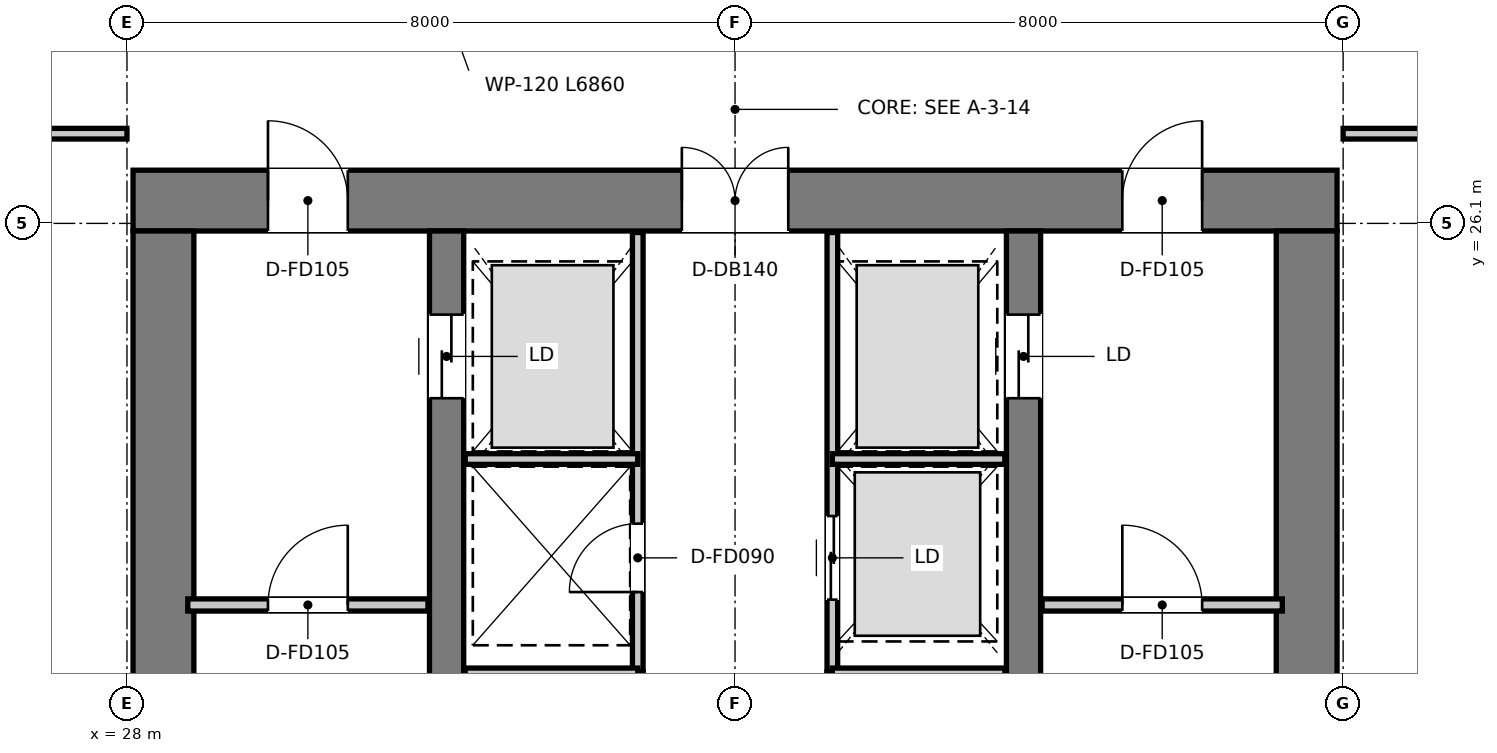
"""IFC4 building model, lengths in metres.
Left out: names, types, materials, properties, quantities, classifications, styles, units other than length and angle.
Written with IfcOpenShell. Run it as: python <this file> out.ifc"""

import sys

from ifc_helpers import new_model, si_unit, direction, frame, frame_2d, origin, place, context, subcontext, project, spatial, rectangle, extrude, element, fill, save


model = new_model("IFC4")
c1 = context("Model", 3, precision=1e-05, world=origin(), true_north=direction((0.0, 1.0)))
c2 = subcontext(c1, "Body", "Model", "MODEL_VIEW")
j1 = project(units=[si_unit("LENGTHUNIT", "METRE"), si_unit("PLANEANGLEUNIT", "RADIAN")], contexts=[c1])
p1 = place(None, origin())
s1 = spatial("IfcSite", under=j1, at=p1, CompositionType="ELEMENT")
p2 = place(p1, origin())
s2 = spatial("IfcBuilding", under=s1, at=p2, CompositionType="ELEMENT")
p3 = place(p2, frame((0.0, 0.0, 250.75)))
s3 = spatial("IfcBuildingStorey", under=s2, at=p3, CompositionType="ELEMENT", Elevation=250.75)
p4 = place(p3, frame((28.08, 26.4, 0.0), z_axis=(0.0, 0.0, 1.0), x_axis=(1.0, 0.0, 0.0)))
e1 = element("IfcWall", 1, at=p4, inside=s3, PredefinedType="SHEAR", context=c2, shape_type="SweptSolid", body=[
    extrude(rectangle(XDim=15.84, YDim=0.8, at=frame_2d((7.92, 0.0))), origin(), (0.0, 0.0, 1.0), 3.95),
])
p5 = place(p4, frame((7.22, 0.0, 0.0)))
e2 = element("IfcOpeningElement", 2, at=p5, cuts=e1, PredefinedType="OPENING", context=c2, shape_type="SweptSolid", body=[
    extrude(rectangle(XDim=1.4, YDim=2.2, at=frame_2d((0.7, 1.1))), frame((0.0, 0.41, 0.0), z_axis=(0.0, -1.0, 0.0), x_axis=(1.0, 0.0, 0.0)), (0.0, 0.0, 1.0), 0.82),
])
p6 = place(p4, frame((1.775, 0.0, 0.0)))
e3 = element("IfcOpeningElement", 3, at=p6, cuts=e1, PredefinedType="OPENING", context=c2, shape_type="SweptSolid", body=[
    extrude(rectangle(XDim=1.05, YDim=2.1, at=frame_2d((0.525, 1.05))), frame((0.0, 0.41, 0.0), z_axis=(0.0, -1.0, 0.0), x_axis=(1.0, 0.0, 0.0)), (0.0, 0.0, 1.0), 0.82),
])
p7 = place(p4, frame((13.015, 0.0, 0.0)))
e4 = element("IfcOpeningElement", 4, at=p7, cuts=e1, PredefinedType="OPENING", context=c2, shape_type="SweptSolid", body=[
    extrude(rectangle(XDim=1.05, YDim=2.1, at=frame_2d((0.525, 1.05))), frame((0.0, 0.41, 0.0), z_axis=(0.0, -1.0, 0.0), x_axis=(1.0, 0.0, 0.0)), (0.0, 0.0, 1.0), 0.82),
])
for number, where, z_axis, x_axis in (
    (5, (28.48, 11.3, 0.0), (0.0, 0.0, 1.0), (0.0, 1.0, 0.0)),
    (6, (43.52, 11.3, 0.0), (0.0, 0.0, 1.0), (0.0, 1.0, 0.0)),
):
    element("IfcWall", number, at=place(p3, frame(where, z_axis=z_axis, x_axis=x_axis)), inside=s3, PredefinedType="SHEAR", context=c2, shape_type="SweptSolid", body=[
        extrude(rectangle(XDim=14.7, YDim=0.8, at=frame_2d((7.35, 0.0))), origin(), (0.0, 0.0, 1.0), 3.95),
    ])
p8 = place(p3, frame((32.205, 13.22, 0.0), z_axis=(0.0, 0.0, 1.0), x_axis=(0.0, 1.0, 0.0)))
e7 = element("IfcWall", 7, at=p8, inside=s3, PredefinedType="SHEAR", context=c2, shape_type="SweptSolid", body=[
    extrude(rectangle(XDim=12.78, YDim=0.45, at=frame_2d((6.39, 0.0))), origin(), (0.0, 0.0, 1.0), 3.95),
])
p9 = place(p8, frame((10.58, 0.0, 0.0)))
e8 = element("IfcOpeningElement", 8, at=p9, cuts=e7, PredefinedType="OPENING", context=c2, shape_type="SweptSolid", body=[
    extrude(rectangle(XDim=1.1, YDim=2.15, at=frame_2d((0.55, 1.075))), frame((0.0, 0.235, 0.0), z_axis=(0.0, -1.0, 0.0), x_axis=(1.0, 0.0, 0.0)), (0.0, 0.0, 1.0), 0.47),
])
p10 = place(p3, frame((39.795, 13.22, 0.0), z_axis=(0.0, 0.0, 1.0), x_axis=(0.0, 1.0, 0.0)))
e9 = element("IfcWall", 9, at=p10, inside=s3, PredefinedType="SHEAR", context=c2, shape_type="SweptSolid", body=[
    extrude(rectangle(XDim=12.78, YDim=0.45, at=frame_2d((6.39, 0.0))), origin(), (0.0, 0.0, 1.0), 3.95),
])
p11 = place(p10, frame((10.58, 0.0, 0.0)))
e10 = element("IfcOpeningElement", 10, at=p11, cuts=e9, PredefinedType="OPENING", context=c2, shape_type="SweptSolid", body=[
    extrude(rectangle(XDim=1.1, YDim=2.15, at=frame_2d((0.55, 1.075))), frame((0.0, 0.235, 0.0), z_axis=(0.0, -1.0, 0.0), x_axis=(1.0, 0.0, 0.0)), (0.0, 0.0, 1.0), 0.47),
])
p12 = place(p3, frame((28.8, 21.08, 0.0), z_axis=(0.0, 0.0, 1.0), x_axis=(1.0, 0.0, 0.0)))
e11 = element("IfcWall", 11, at=p12, inside=s3, PredefinedType="PARTITIONING", context=c2, shape_type="SweptSolid", body=[
    extrude(rectangle(XDim=3.16, YDim=0.16, at=frame_2d((1.58, 0.0))), origin(), (0.0, 0.0, 1.0), 3.67),
])
p13 = place(p12, frame((1.055, 0.0, 0.0)))
e12 = element("IfcOpeningElement", 12, at=p13, cuts=e11, PredefinedType="OPENING", context=c2, shape_type="SweptSolid", body=[
    extrude(rectangle(XDim=1.05, YDim=2.1, at=frame_2d((0.525, 1.05))), frame((0.0, 0.09, 0.0), z_axis=(0.0, -1.0, 0.0), x_axis=(1.0, 0.0, 0.0)), (0.0, 0.0, 1.0), 0.18),
])
p14 = place(p3, frame((40.04, 21.08, 0.0), z_axis=(0.0, 0.0, 1.0), x_axis=(1.0, 0.0, 0.0)))
e13 = element("IfcWall", 13, at=p14, inside=s3, PredefinedType="PARTITIONING", context=c2, shape_type="SweptSolid", body=[
    extrude(rectangle(XDim=3.16, YDim=0.16, at=frame_2d((1.58, 0.0))), origin(), (0.0, 0.0, 1.0), 3.67),
])
p15 = place(p14, frame((1.055, 0.0, 0.0)))
e14 = element("IfcOpeningElement", 14, at=p15, cuts=e13, PredefinedType="OPENING", context=c2, shape_type="SweptSolid", body=[
    extrude(rectangle(XDim=1.05, YDim=2.1, at=frame_2d((0.525, 1.05))), frame((0.0, 0.09, 0.0), z_axis=(0.0, -1.0, 0.0), x_axis=(1.0, 0.0, 0.0)), (0.0, 0.0, 1.0), 0.18),
])
p16 = place(p3, frame((34.72, 20.2, 0.0), z_axis=(0.0, 0.0, 1.0), x_axis=(0.0, 1.0, 0.0)))
e15 = element("IfcWall", 15, at=p16, inside=s3, PredefinedType="PARTITIONING", context=c2, shape_type="SweptSolid", body=[
    extrude(rectangle(XDim=5.78, YDim=0.14, at=frame_2d((2.89, 0.0))), origin(), (0.0, 0.0, 1.0), 2.82),
])
p17 = place(p16, frame((1.05, 0.0, 0.0)))
e16 = element("IfcOpeningElement", 16, at=p17, cuts=e15, PredefinedType="OPENING", context=c2, shape_type="SweptSolid", body=[
    extrude(rectangle(XDim=0.9, YDim=2.1, at=frame_2d((0.45, 1.05))), frame((0.0, 0.08, 0.0), z_axis=(0.0, -1.0, 0.0), x_axis=(1.0, 0.0, 0.0)), (0.0, 0.0, 1.0), 0.16),
])
p18 = place(p3, frame((37.28, 20.2, 0.0), z_axis=(0.0, 0.0, 1.0), x_axis=(0.0, 1.0, 0.0)))
e17 = element("IfcWall", 17, at=p18, inside=s3, PredefinedType="PARTITIONING", context=c2, shape_type="SweptSolid", body=[
    extrude(rectangle(XDim=5.78, YDim=0.14, at=frame_2d((2.89, 0.0))), origin(), (0.0, 0.0, 1.0), 2.82),
])
p19 = place(p18, frame((0.95, 0.0, 0.0)))
e18 = element("IfcOpeningElement", 18, at=p19, cuts=e17, PredefinedType="OPENING", context=c2, shape_type="SweptSolid", body=[
    extrude(rectangle(XDim=1.1, YDim=2.15, at=frame_2d((0.55, 1.075))), frame((0.0, 0.08, 0.0), z_axis=(0.0, -1.0, 0.0), x_axis=(1.0, 0.0, 0.0)), (0.0, 0.0, 1.0), 0.16),
])
for number, where, z_axis, x_axis in (
    (19, (32.45, 23.0, 0.0), (0.0, 0.0, 1.0), (1.0, 0.0, 0.0)),
    (20, (37.28, 23.0, 0.0), (0.0, 0.0, 1.0), (1.0, 0.0, 0.0)),
):
    element("IfcWall", number, at=place(p3, frame(where, z_axis=z_axis, x_axis=x_axis)), inside=s3, PredefinedType="PARTITIONING", context=c2, shape_type="SweptSolid", body=[
        extrude(rectangle(XDim=2.27, YDim=0.14, at=frame_2d((1.135, 0.0))), origin(), (0.0, 0.0, 1.0), 2.82),
    ])
for number, where, z_axis, x_axis in (
    (21, (34.72, 17.78, 0.0), (0.0, 0.0, 1.0), (0.0, 1.0, 0.0)),
    (22, (37.28, 17.78, 0.0), (0.0, 0.0, 1.0), (0.0, 1.0, 0.0)),
):
    element("IfcWall", number, at=place(p3, frame(where, z_axis=z_axis, x_axis=x_axis)), inside=s3, PredefinedType="PARTITIONING", context=c2, shape_type="SweptSolid", body=[
        extrude(rectangle(XDim=2.42, YDim=0.14, at=frame_2d((1.21, 0.0))), origin(), (0.0, 0.0, 1.0), 3.67),
    ])
for number, where, z_axis, x_axis in (
    (23, (32.45, 20.18, 0.0), (0.0, 0.0, 1.0), (1.0, 0.0, 0.0)),
    (24, (37.28, 20.18, 0.0), (0.0, 0.0, 1.0), (1.0, 0.0, 0.0)),
):
    element("IfcWall", number, at=place(p3, frame(where, z_axis=z_axis, x_axis=x_axis)), inside=s3, PredefinedType="PARTITIONING", context=c2, shape_type="SweptSolid", body=[
        extrude(rectangle(XDim=2.27, YDim=0.14, at=frame_2d((1.135, 0.0))), origin(), (0.0, 0.0, 1.0), 3.67),
    ])
p20 = place(p3, frame((13.439, 27.28, 0.0), z_axis=(0.0, 0.0, 1.0), x_axis=(1.0, 0.0, 0.0)))
e25 = element("IfcWall", 25, at=p20, inside=s3, PredefinedType="PARTITIONING", context=c2, shape_type="SweptSolid", body=[
    extrude(rectangle(XDim=14.561, YDim=0.14, at=frame_2d((7.28, 0.0))), origin(), (0.0, 0.0, 1.0), 3.03),
])
p21 = place(p20, frame((1.347, 0.0, 0.0)))
e26 = element("IfcOpeningElement", 26, at=p21, cuts=e25, PredefinedType="OPENING", context=c2, shape_type="SweptSolid", body=[
    extrude(rectangle(XDim=0.9, YDim=2.1, at=frame_2d((0.45, 1.05))), frame((0.0, 0.08, 0.0), z_axis=(0.0, -1.0, 0.0), x_axis=(1.0, 0.0, 0.0)), (0.0, 0.0, 1.0), 0.16),
])
p22 = place(p20, frame((8.91, 0.0, 0.0)))
e27 = element("IfcOpeningElement", 27, at=p22, cuts=e25, PredefinedType="OPENING", context=c2, shape_type="SweptSolid", body=[
    extrude(rectangle(XDim=0.9, YDim=2.1, at=frame_2d((0.45, 1.05))), frame((0.0, 0.08, 0.0), z_axis=(0.0, -1.0, 0.0), x_axis=(1.0, 0.0, 0.0)), (0.0, 0.0, 1.0), 0.16),
])
p23 = place(p20, frame((12.21, 0.0, 0.0)))
e28 = element("IfcOpeningElement", 28, at=p23, cuts=e25, PredefinedType="OPENING", context=c2, shape_type="SweptSolid", body=[
    extrude(rectangle(XDim=0.9, YDim=2.1, at=frame_2d((0.45, 1.05))), frame((0.0, 0.08, 0.0), z_axis=(0.0, -1.0, 0.0), x_axis=(1.0, 0.0, 0.0)), (0.0, 0.0, 1.0), 0.16),
])
p24 = place(p3, frame((44.0, 27.28, 0.0), z_axis=(0.0, 0.0, 1.0), x_axis=(1.0, 0.0, 0.0)))
e29 = element("IfcWall", 29, at=p24, inside=s3, PredefinedType="PARTITIONING", context=c2, shape_type="SweptSolid", body=[
    extrude(rectangle(XDim=15.889, YDim=0.14, at=frame_2d((7.944, 0.0))), origin(), (0.0, 0.0, 1.0), 3.03),
])
p25 = place(p24, frame((1.75, 0.0, 0.0)))
e30 = element("IfcOpeningElement", 30, at=p25, cuts=e29, PredefinedType="OPENING", context=c2, shape_type="SweptSolid", body=[
    extrude(rectangle(XDim=0.9, YDim=2.1, at=frame_2d((0.45, 1.05))), frame((0.0, 0.08, 0.0), z_axis=(0.0, -1.0, 0.0), x_axis=(1.0, 0.0, 0.0)), (0.0, 0.0, 1.0), 0.16),
])
p26 = place(p24, frame((4.75, 0.0, 0.0)))
e31 = element("IfcOpeningElement", 31, at=p26, cuts=e29, PredefinedType="OPENING", context=c2, shape_type="SweptSolid", body=[
    extrude(rectangle(XDim=0.9, YDim=2.1, at=frame_2d((0.45, 1.05))), frame((0.0, 0.08, 0.0), z_axis=(0.0, -1.0, 0.0), x_axis=(1.0, 0.0, 0.0)), (0.0, 0.0, 1.0), 0.16),
])
p27 = place(p24, frame((12.313, 0.0, 0.0)))
e32 = element("IfcOpeningElement", 32, at=p27, cuts=e29, PredefinedType="OPENING", context=c2, shape_type="SweptSolid", body=[
    extrude(rectangle(XDim=0.9, YDim=2.1, at=frame_2d((0.45, 1.05))), frame((0.0, 0.08, 0.0), z_axis=(0.0, -1.0, 0.0), x_axis=(1.0, 0.0, 0.0)), (0.0, 0.0, 1.0), 0.16),
])
p28 = place(p13, origin())
e33 = element("IfcDoor", 33, at=p28, inside=s3, OperationType="SINGLE_SWING_RIGHT", PredefinedType="DOOR", context=c2, shape_type="SweptSolid", body=[
    extrude(rectangle(XDim=1.05, YDim=2.1, at=frame_2d((0.525, 1.05))), frame((0.0, 0.025, 0.0), z_axis=(0.0, -1.0, 0.0), x_axis=(1.0, 0.0, 0.0)), (0.0, 0.0, 1.0), 0.05),
])
fill(e12, e33)
p29 = place(p15, origin())
e34 = element("IfcDoor", 34, at=p29, inside=s3, OperationType="SINGLE_SWING_LEFT", PredefinedType="DOOR", context=c2, shape_type="SweptSolid", body=[
    extrude(rectangle(XDim=1.05, YDim=2.1, at=frame_2d((0.525, 1.05))), frame((0.0, 0.025, 0.0), z_axis=(0.0, -1.0, 0.0), x_axis=(1.0, 0.0, 0.0)), (0.0, 0.0, 1.0), 0.05),
])
fill(e14, e34)
p30 = place(p5, origin())
e35 = element("IfcDoor", 35, at=p30, inside=s3, OperationType="DOUBLE_DOOR_SINGLE_SWING", PredefinedType="DOOR", context=c2, shape_type="SweptSolid", body=[
    extrude(rectangle(XDim=1.4, YDim=2.2, at=frame_2d((0.7, 1.1))), frame((0.0, 0.025, 0.0), z_axis=(0.0, -1.0, 0.0), x_axis=(1.0, 0.0, 0.0)), (0.0, 0.0, 1.0), 0.05),
])
fill(e2, e35)
p31 = place(p6, origin())
e36 = element("IfcDoor", 36, at=p31, inside=s3, OperationType="SINGLE_SWING_LEFT", PredefinedType="DOOR", context=c2, shape_type="SweptSolid", body=[
    extrude(rectangle(XDim=1.05, YDim=2.1, at=frame_2d((0.525, 1.05))), frame((0.0, 0.025, 0.0), z_axis=(0.0, -1.0, 0.0), x_axis=(1.0, 0.0, 0.0)), (0.0, 0.0, 1.0), 0.05),
])
fill(e3, e36)
p32 = place(p7, origin())
e37 = element("IfcDoor", 37, at=p32, inside=s3, OperationType="SINGLE_SWING_RIGHT", PredefinedType="DOOR", context=c2, shape_type="SweptSolid", body=[
    extrude(rectangle(XDim=1.05, YDim=2.1, at=frame_2d((0.525, 1.05))), frame((0.0, 0.025, 0.0), z_axis=(0.0, -1.0, 0.0), x_axis=(1.0, 0.0, 0.0)), (0.0, 0.0, 1.0), 0.05),
])
fill(e4, e37)
p33 = place(p9, origin())
e38 = element("IfcDoor", 38, at=p33, inside=s3, OperationType="DOUBLE_DOOR_SLIDING", PredefinedType="DOOR", context=c2, shape_type="SweptSolid", body=[
    extrude(rectangle(XDim=1.1, YDim=2.15, at=frame_2d((0.55, 1.075))), frame((0.0, 0.025, 0.0), z_axis=(0.0, -1.0, 0.0), x_axis=(1.0, 0.0, 0.0)), (0.0, 0.0, 1.0), 0.05),
])
fill(e8, e38)
p34 = place(p11, origin())
e39 = element("IfcDoor", 39, at=p34, inside=s3, OperationType="DOUBLE_DOOR_SLIDING", PredefinedType="DOOR", context=c2, shape_type="SweptSolid", body=[
    extrude(rectangle(XDim=1.1, YDim=2.15, at=frame_2d((0.55, 1.075))), frame((0.0, 0.025, 0.0), z_axis=(0.0, -1.0, 0.0), x_axis=(1.0, 0.0, 0.0)), (0.0, 0.0, 1.0), 0.05),
])
fill(e10, e39)
p35 = place(p17, origin())
e40 = element("IfcDoor", 40, at=p35, inside=s3, OperationType="SINGLE_SWING_LEFT", PredefinedType="DOOR", context=c2, shape_type="SweptSolid", body=[
    extrude(rectangle(XDim=0.9, YDim=2.1, at=frame_2d((0.45, 1.05))), frame((0.0, 0.025, 0.0), z_axis=(0.0, -1.0, 0.0), x_axis=(1.0, 0.0, 0.0)), (0.0, 0.0, 1.0), 0.05),
])
fill(e16, e40)
p36 = place(p19, origin())
e41 = element("IfcDoor", 41, at=p36, inside=s3, OperationType="DOUBLE_DOOR_SLIDING", PredefinedType="DOOR", context=c2, shape_type="SweptSolid", body=[
    extrude(rectangle(XDim=1.1, YDim=2.15, at=frame_2d((0.55, 1.075))), frame((0.0, 0.025, 0.0), z_axis=(0.0, -1.0, 0.0), x_axis=(1.0, 0.0, 0.0)), (0.0, 0.0, 1.0), 0.05),
])
fill(e18, e41)
save(model, sys.argv[1])
